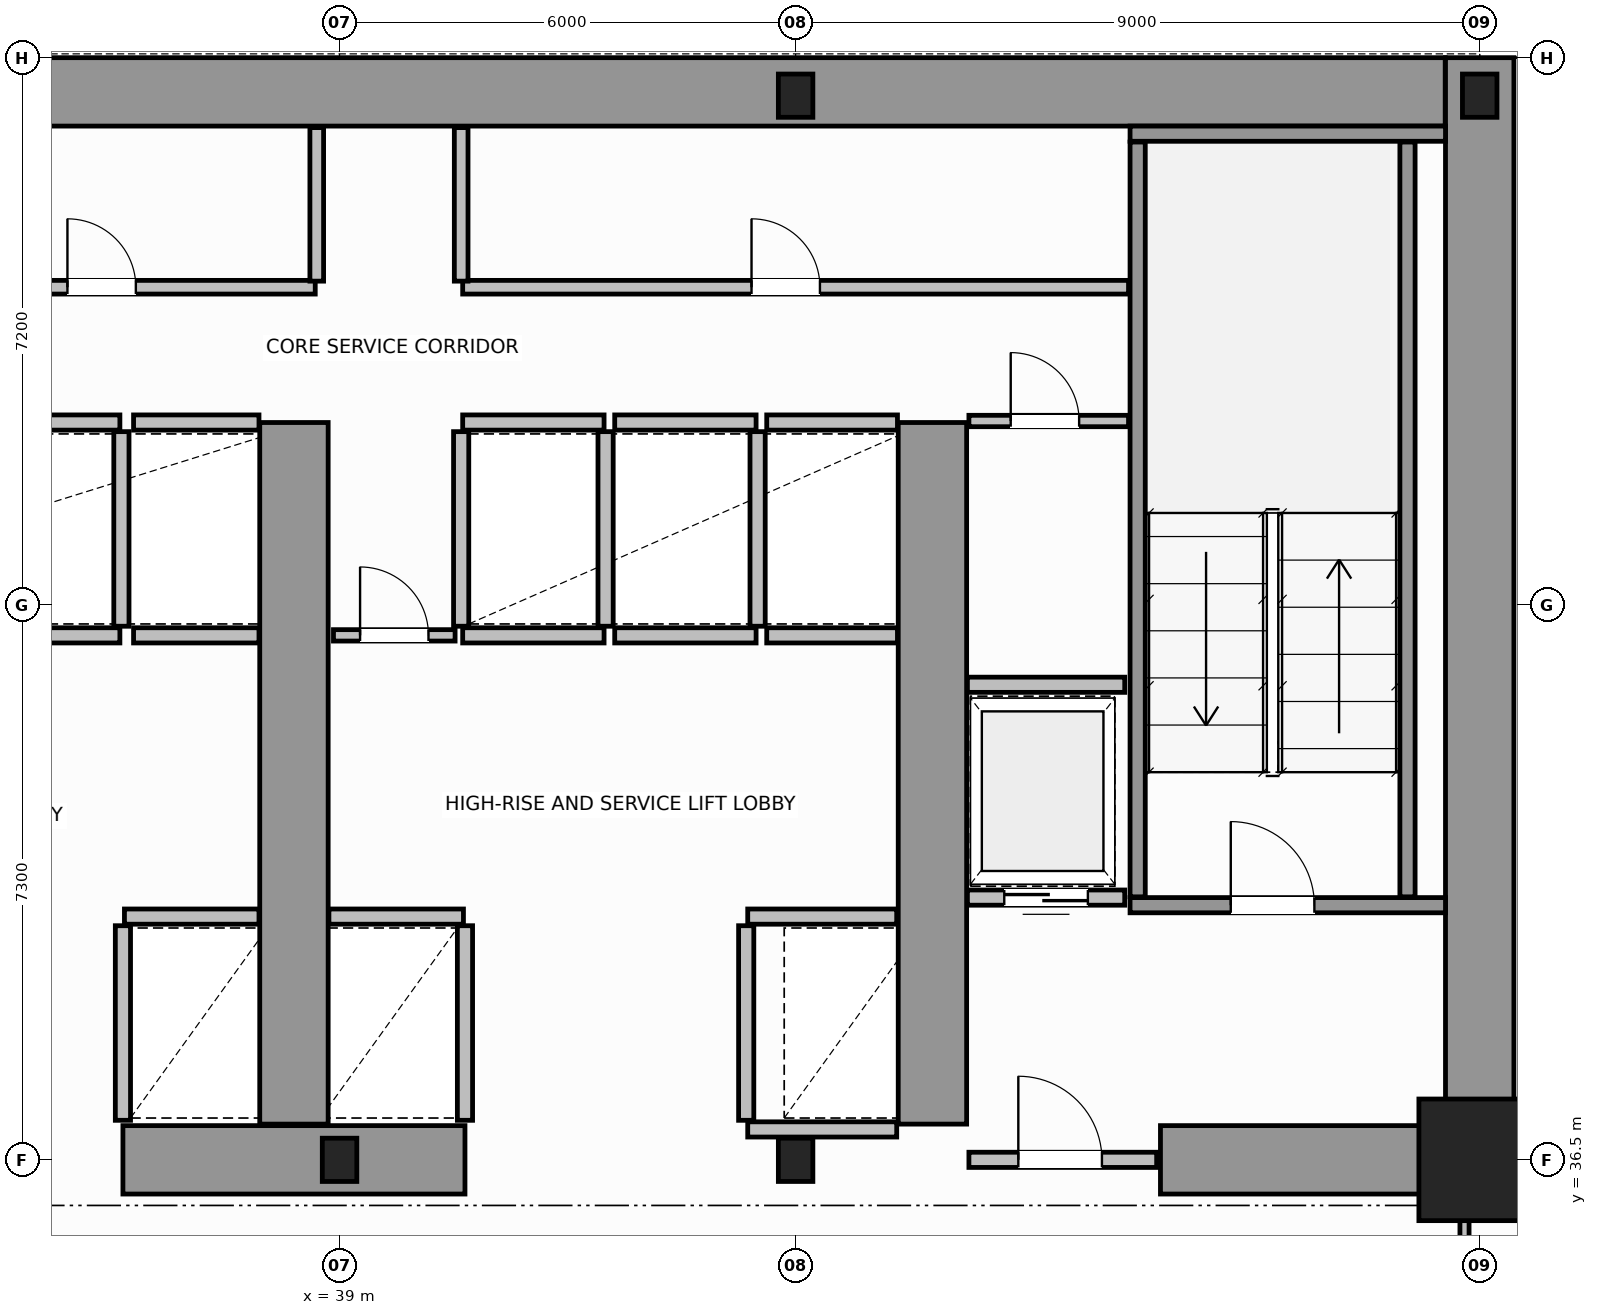
"""IFC4 building model, lengths in metres.
Left out: names, types, materials, properties, quantities, classifications, styles, units other than length and angle.
Written with IfcOpenShell. Run it as: python <this file> out.ifc"""

import sys

from ifc_helpers import new_model, si_unit, direction, frame, frame_2d, origin, origin_2d, place, context, subcontext, project, spatial, rectangle, i_section, extrude, source, transform, mapped, element, fill, save


model = new_model("IFC4")
c1 = context("Model", 3, precision=1e-05, world=origin(), true_north=direction((0.0, 1.0)))
c2 = subcontext(c1, "Body", "Model", "MODEL_VIEW")
j1 = project(units=[si_unit("LENGTHUNIT", "METRE"), si_unit("PLANEANGLEUNIT", "RADIAN")], contexts=[c1])
p1 = place(None, origin())
s1 = spatial("IfcSite", under=j1, at=p1, CompositionType="ELEMENT")
p2 = place(p1, origin())
s2 = spatial("IfcBuilding", under=s1, at=p2, CompositionType="ELEMENT")
p3 = place(p2, frame((0.0, 0.0, 26.4)))
s3 = spatial("IfcBuildingStorey", under=s2, at=p3, CompositionType="ELEMENT", Elevation=26.4)
m1 = source(origin(), c2, "Body", "SweptSolid", [
    extrude(i_section(OverallWidth=0.454, OverallDepth=0.569, WebThickness=0.078, FlangeThickness=0.08, FilletRadius=0.015, at=origin_2d()), origin(), (0.0, 0.0, 1.0), 3.8),
])
for number, where, z_axis, x_axis in (
    (1, (39.0, 36.5, 0.0), (0.0, 0.0, 1.0), (1.0, 0.0, 0.0)),
    (2, (45.0, 36.5, 0.0), (0.0, 0.0, 1.0), (1.0, 0.0, 0.0)),
):
    element("IfcColumn", number, at=place(p3, frame(where, z_axis=z_axis, x_axis=x_axis)), inside=s3, PredefinedType="COLUMN", context=c2, shape_type="MappedRepresentation", body=[
        mapped(m1, transform((0.0, 0.0, 0.0), scale=1.0)),
    ])
m2 = source(origin(), c2, "Body", "SweptSolid", [
    extrude(rectangle(XDim=1.6, YDim=1.6, at=origin_2d()), origin(), (0.0, 0.0, 1.0), 3.8),
])
p4 = place(p3, frame((54.0, 36.5, 0.0), z_axis=(0.0, 0.0, 1.0), x_axis=(1.0, 0.0, 0.0)))
e3 = element("IfcColumn", 3, at=p4, inside=s3, PredefinedType="COLUMN", context=c2, shape_type="MappedRepresentation", body=[
    mapped(m2, transform((0.0, 0.0, 0.0), scale=1.0)),
])
for number, where, z_axis, x_axis in (
    (4, (45.0, 50.5, 0.0), (0.0, 0.0, 1.0), (1.0, 0.0, 0.0)),
    (5, (54.0, 50.5, 0.0), (0.0, 0.0, 1.0), (1.0, 0.0, 0.0)),
):
    element("IfcColumn", number, at=place(p3, frame(where, z_axis=z_axis, x_axis=x_axis)), inside=s3, PredefinedType="COLUMN", context=c2, shape_type="MappedRepresentation", body=[
        mapped(m1, transform((0.0, 0.0, 0.0), scale=1.0)),
    ])
p5 = place(p3, frame((34.002, 50.55, 0.0), z_axis=(0.0, 0.0, 1.0), x_axis=(1.0, 0.0, 0.0)))
e6 = element("IfcWall", 6, at=p5, inside=s3, PredefinedType="SHEAR", context=c2, shape_type="SweptSolid", body=[
    extrude(rectangle(XDim=19.544, YDim=0.9, at=frame_2d((9.772, 0.0))), origin(), (0.0, 0.0, 1.0), 3.8),
])
p6 = place(p3, frame((54.0, 36.5, 0.0), z_axis=(0.0, 0.0, 1.0), x_axis=(0.0, 1.0, 0.0)))
e7 = element("IfcWall", 7, at=p6, inside=s3, PredefinedType="SHEAR", context=c2, shape_type="SweptSolid", body=[
    extrude(rectangle(XDim=14.5, YDim=0.9, at=frame_2d((7.25, 0.0))), origin(), (0.0, 0.0, 1.0), 3.8),
])
p7 = place(p3, frame((36.15, 36.5, 0.0), z_axis=(0.0, 0.0, 1.0), x_axis=(1.0, 0.0, 0.0)))
e8 = element("IfcWall", 8, at=p7, inside=s3, PredefinedType="SHEAR", context=c2, shape_type="SweptSolid", body=[
    extrude(rectangle(XDim=4.5, YDim=0.9, at=frame_2d((2.25, 0.0))), origin(), (0.0, 0.0, 1.0), 3.8),
])
p8 = place(p3, frame((49.8, 36.5, 0.0), z_axis=(0.0, 0.0, 1.0), x_axis=(1.0, 0.0, 0.0)))
e9 = element("IfcWall", 9, at=p8, inside=s3, PredefinedType="SHEAR", context=c2, shape_type="SweptSolid", body=[
    extrude(rectangle(XDim=3.73, YDim=0.9, at=frame_2d((1.865, 0.0))), origin(), (0.0, 0.0, 1.0), 2.38),
])
for number, where, z_axis, x_axis in (
    (10, (38.4, 36.97, 0.0), (0.0, 0.0, 1.0), (0.0, 1.0, 0.0)),
    (11, (46.8, 36.97, 0.0), (0.0, 0.0, 1.0), (0.0, 1.0, 0.0)),
):
    element("IfcWall", number, at=place(p3, frame(where, z_axis=z_axis, x_axis=x_axis)), inside=s3, PredefinedType="SHEAR", context=c2, shape_type="SweptSolid", body=[
        extrude(rectangle(XDim=9.23, YDim=0.9, at=frame_2d((4.615, 0.0))), origin(), (0.0, 0.0, 1.0), 3.8),
    ])
p9 = place(p3, frame((49.4, 39.85, 0.0), z_axis=(0.0, 0.0, 1.0), x_axis=(1.0, 0.0, 0.0)))
e12 = element("IfcWall", 12, at=p9, inside=s3, PredefinedType="SOLIDWALL", context=c2, shape_type="SweptSolid", body=[
    extrude(rectangle(XDim=4.15, YDim=0.2, at=frame_2d((2.075, 0.0))), origin(), (0.0, 0.0, 1.0), 3.8),
])
p10 = place(p9, frame((1.325, 0.0, 0.0)))
e13 = element("IfcOpeningElement", 13, at=p10, cuts=e12, PredefinedType="OPENING", context=c2, shape_type="SweptSolid", body=[
    extrude(rectangle(XDim=1.1, YDim=2.15, at=frame_2d((0.55, 1.075))), frame((0.0, 0.11, 0.0), z_axis=(0.0, -1.0, 0.0), x_axis=(1.0, 0.0, 0.0)), (0.0, 0.0, 1.0), 0.22),
])
p11 = place(p3, frame((49.4, 50.0, 0.0), z_axis=(0.0, 0.0, 1.0), x_axis=(1.0, 0.0, 0.0)))
e14 = element("IfcWall", 14, at=p11, inside=s3, PredefinedType="SOLIDWALL", context=c2, shape_type="SweptSolid", body=[
    extrude(rectangle(XDim=4.15, YDim=0.2, at=frame_2d((2.075, 0.0))), origin(), (0.0, 0.0, 1.0), 3.8),
])
for number, where, z_axis, x_axis in (
    (15, (49.5, 39.96, 0.0), (0.0, 0.0, 1.0), (0.0, 1.0, 0.0)),
    (16, (53.05, 39.96, 0.0), (0.0, 0.0, 1.0), (0.0, 1.0, 0.0)),
):
    element("IfcWall", number, at=place(p3, frame(where, z_axis=z_axis, x_axis=x_axis)), inside=s3, PredefinedType="SOLIDWALL", context=c2, shape_type="SweptSolid", body=[
        extrude(rectangle(XDim=9.93, YDim=0.2, at=frame_2d((4.965, 0.0))), origin(), (0.0, 0.0, 1.0), 3.8),
    ])
p12 = place(p3, frame((47.28, 36.5, 0.0), z_axis=(0.0, 0.0, 1.0), x_axis=(1.0, 0.0, 0.0)))
e17 = element("IfcWall", 17, at=p12, inside=s3, PredefinedType="SOLIDWALL", context=c2, shape_type="SweptSolid", body=[
    extrude(rectangle(XDim=2.47, YDim=0.2, at=frame_2d((1.235, 0.0))), origin(), (0.0, 0.0, 1.0), 2.37),
])
p13 = place(p12, frame((0.65, 0.0, 0.0)))
e18 = element("IfcOpeningElement", 18, at=p13, cuts=e17, PredefinedType="OPENING", context=c2, shape_type="SweptSolid", body=[
    extrude(rectangle(XDim=1.1, YDim=2.15, at=frame_2d((0.55, 1.075))), frame((0.0, 0.11, 0.0), z_axis=(0.0, -1.0, 0.0), x_axis=(1.0, 0.0, 0.0)), (0.0, 0.0, 1.0), 0.22),
])
p14 = place(p3, frame((36.17, 39.7, 0.0), z_axis=(0.0, 0.0, 1.0), x_axis=(1.0, 0.0, 0.0)))
e19 = element("IfcWall", 19, at=p14, inside=s3, PredefinedType="SOLIDWALL", context=c2, shape_type="SweptSolid", body=[
    extrude(rectangle(XDim=1.77, YDim=0.2, at=frame_2d((0.885, 0.0))), origin(), (0.0, 0.0, 1.0), 3.58),
])
p15 = place(p3, frame((36.15, 37.02, 0.0), z_axis=(0.0, 0.0, 1.0), x_axis=(0.0, 1.0, 0.0)))
e20 = element("IfcWall", 20, at=p15, inside=s3, PredefinedType="SOLIDWALL", context=c2, shape_type="SweptSolid", body=[
    extrude(rectangle(XDim=2.56, YDim=0.2, at=frame_2d((1.28, 0.0))), origin(), (0.0, 0.0, 1.0), 3.58),
])
for number, where, z_axis, x_axis in (
    (21, (34.19, 43.4, 0.0), (0.0, 0.0, 1.0), (1.0, 0.0, 0.0)),
    (22, (34.19, 46.2, 0.0), (0.0, 0.0, 1.0), (1.0, 0.0, 0.0)),
):
    element("IfcWall", number, at=place(p3, frame(where, z_axis=z_axis, x_axis=x_axis)), inside=s3, PredefinedType="SOLIDWALL", context=c2, shape_type="SweptSolid", body=[
        extrude(rectangle(XDim=1.92, YDim=0.2, at=frame_2d((0.96, 0.0))), origin(), (0.0, 0.0, 1.0), 3.58),
    ])
p16 = place(p3, frame((36.13, 43.52, 0.0), z_axis=(0.0, 0.0, 1.0), x_axis=(0.0, 1.0, 0.0)))
e23 = element("IfcWall", 23, at=p16, inside=s3, PredefinedType="SOLIDWALL", context=c2, shape_type="SweptSolid", body=[
    extrude(rectangle(XDim=2.56, YDim=0.2, at=frame_2d((1.28, 0.0))), origin(), (0.0, 0.0, 1.0), 3.58),
])
for number, where, z_axis, x_axis in (
    (24, (36.29, 43.4, 0.0), (0.0, 0.0, 1.0), (1.0, 0.0, 0.0)),
    (25, (36.29, 46.2, 0.0), (0.0, 0.0, 1.0), (1.0, 0.0, 0.0)),
):
    element("IfcWall", number, at=place(p3, frame(where, z_axis=z_axis, x_axis=x_axis)), inside=s3, PredefinedType="SOLIDWALL", context=c2, shape_type="SweptSolid", body=[
        extrude(rectangle(XDim=1.65, YDim=0.2, at=frame_2d((0.825, 0.0))), origin(), (0.0, 0.0, 1.0), 3.58),
    ])
p17 = place(p3, frame((38.86, 39.7, 0.0), z_axis=(0.0, 0.0, 1.0), x_axis=(1.0, 0.0, 0.0)))
e26 = element("IfcWall", 26, at=p17, inside=s3, PredefinedType="SOLIDWALL", context=c2, shape_type="SweptSolid", body=[
    extrude(rectangle(XDim=1.77, YDim=0.2, at=frame_2d((0.885, 0.0))), origin(), (0.0, 0.0, 1.0), 3.58),
])
p18 = place(p3, frame((40.65, 37.02, 0.0), z_axis=(0.0, 0.0, 1.0), x_axis=(0.0, 1.0, 0.0)))
e27 = element("IfcWall", 27, at=p18, inside=s3, PredefinedType="SOLIDWALL", context=c2, shape_type="SweptSolid", body=[
    extrude(rectangle(XDim=2.56, YDim=0.2, at=frame_2d((1.28, 0.0))), origin(), (0.0, 0.0, 1.0), 3.58),
])
p19 = place(p3, frame((44.37, 39.7, 0.0), z_axis=(0.0, 0.0, 1.0), x_axis=(1.0, 0.0, 0.0)))
e28 = element("IfcWall", 28, at=p19, inside=s3, PredefinedType="SOLIDWALL", context=c2, shape_type="SweptSolid", body=[
    extrude(rectangle(XDim=1.96, YDim=0.2, at=frame_2d((0.98, 0.0))), origin(), (0.0, 0.0, 1.0), 3.58),
])
p20 = place(p3, frame((44.37, 36.9, 0.0), z_axis=(0.0, 0.0, 1.0), x_axis=(1.0, 0.0, 0.0)))
e29 = element("IfcWall", 29, at=p20, inside=s3, PredefinedType="SOLIDWALL", context=c2, shape_type="SweptSolid", body=[
    extrude(rectangle(XDim=1.96, YDim=0.2, at=frame_2d((0.98, 0.0))), origin(), (0.0, 0.0, 1.0), 2.37),
])
p21 = place(p3, frame((44.35, 37.02, 0.0), z_axis=(0.0, 0.0, 1.0), x_axis=(0.0, 1.0, 0.0)))
e30 = element("IfcWall", 30, at=p21, inside=s3, PredefinedType="SOLIDWALL", context=c2, shape_type="SweptSolid", body=[
    extrude(rectangle(XDim=2.56, YDim=0.2, at=frame_2d((1.28, 0.0))), origin(), (0.0, 0.0, 1.0), 3.58),
])
for number, where, z_axis, x_axis in (
    (31, (40.62, 43.4, 0.0), (0.0, 0.0, 1.0), (1.0, 0.0, 0.0)),
    (32, (40.62, 46.2, 0.0), (0.0, 0.0, 1.0), (1.0, 0.0, 0.0)),
):
    element("IfcWall", number, at=place(p3, frame(where, z_axis=z_axis, x_axis=x_axis)), inside=s3, PredefinedType="SOLIDWALL", context=c2, shape_type="SweptSolid", body=[
        extrude(rectangle(XDim=1.86, YDim=0.2, at=frame_2d((0.93, 0.0))), origin(), (0.0, 0.0, 1.0), 3.58),
    ])
for number, where, z_axis, x_axis in (
    (33, (40.6, 43.52, 0.0), (0.0, 0.0, 1.0), (0.0, 1.0, 0.0)),
    (34, (42.5, 43.52, 0.0), (0.0, 0.0, 1.0), (0.0, 1.0, 0.0)),
):
    element("IfcWall", number, at=place(p3, frame(where, z_axis=z_axis, x_axis=x_axis)), inside=s3, PredefinedType="SOLIDWALL", context=c2, shape_type="SweptSolid", body=[
        extrude(rectangle(XDim=2.56, YDim=0.2, at=frame_2d((1.28, 0.0))), origin(), (0.0, 0.0, 1.0), 3.58),
    ])
for number, where, z_axis, x_axis in (
    (35, (42.62, 43.4, 0.0), (0.0, 0.0, 1.0), (1.0, 0.0, 0.0)),
    (36, (42.62, 46.2, 0.0), (0.0, 0.0, 1.0), (1.0, 0.0, 0.0)),
):
    element("IfcWall", number, at=place(p3, frame(where, z_axis=z_axis, x_axis=x_axis)), inside=s3, PredefinedType="SOLIDWALL", context=c2, shape_type="SweptSolid", body=[
        extrude(rectangle(XDim=1.86, YDim=0.2, at=frame_2d((0.93, 0.0))), origin(), (0.0, 0.0, 1.0), 3.58),
    ])
p22 = place(p3, frame((44.5, 43.52, 0.0), z_axis=(0.0, 0.0, 1.0), x_axis=(0.0, 1.0, 0.0)))
e37 = element("IfcWall", 37, at=p22, inside=s3, PredefinedType="SOLIDWALL", context=c2, shape_type="SweptSolid", body=[
    extrude(rectangle(XDim=2.56, YDim=0.2, at=frame_2d((1.28, 0.0))), origin(), (0.0, 0.0, 1.0), 3.58),
])
for number, where, z_axis, x_axis in (
    (38, (44.62, 43.4, 0.0), (0.0, 0.0, 1.0), (1.0, 0.0, 0.0)),
    (39, (44.62, 46.2, 0.0), (0.0, 0.0, 1.0), (1.0, 0.0, 0.0)),
):
    element("IfcWall", number, at=place(p3, frame(where, z_axis=z_axis, x_axis=x_axis)), inside=s3, PredefinedType="SOLIDWALL", context=c2, shape_type="SweptSolid", body=[
        extrude(rectangle(XDim=1.72, YDim=0.2, at=frame_2d((0.86, 0.0))), origin(), (0.0, 0.0, 1.0), 3.58),
    ])
p23 = place(p3, frame((47.26, 39.95, 0.0), z_axis=(0.0, 0.0, 1.0), x_axis=(1.0, 0.0, 0.0)))
e40 = element("IfcWall", 40, at=p23, inside=s3, PredefinedType="SOLIDWALL", context=c2, shape_type="SweptSolid", body=[
    extrude(rectangle(XDim=2.07, YDim=0.2, at=frame_2d((1.035, 0.0))), origin(), (0.0, 0.0, 1.0), 3.58),
])
p24 = place(p23, frame((0.485, 0.0, 0.0)))
e41 = element("IfcOpeningElement", 41, at=p24, cuts=e40, PredefinedType="OPENING", context=c2, shape_type="SweptSolid", body=[
    extrude(rectangle(XDim=1.1, YDim=2.15, at=frame_2d((0.55, 1.075))), frame((0.0, 0.11, 0.0), z_axis=(0.0, -1.0, 0.0), x_axis=(1.0, 0.0, 0.0)), (0.0, 0.0, 1.0), 0.22),
])
p25 = place(p3, frame((47.26, 42.75, 0.0), z_axis=(0.0, 0.0, 1.0), x_axis=(1.0, 0.0, 0.0)))
e42 = element("IfcWall", 42, at=p25, inside=s3, PredefinedType="SOLIDWALL", context=c2, shape_type="SweptSolid", body=[
    extrude(rectangle(XDim=2.07, YDim=0.2, at=frame_2d((1.035, 0.0))), origin(), (0.0, 0.0, 1.0), 3.58),
])
p26 = place(p3, frame((47.28, 46.22, 0.0), z_axis=(0.0, 0.0, 1.0), x_axis=(1.0, 0.0, 0.0)))
e43 = element("IfcWall", 43, at=p26, inside=s3, PredefinedType="PARTITIONING", context=c2, shape_type="SweptSolid", body=[
    extrude(rectangle(XDim=2.1, YDim=0.15, at=frame_2d((1.05, 0.0))), origin(), (0.0, 0.0, 1.0), 3.58),
])
p27 = place(p26, frame((0.55, 0.0, 0.0)))
e44 = element("IfcOpeningElement", 44, at=p27, cuts=e43, PredefinedType="OPENING", context=c2, shape_type="SweptSolid", body=[
    extrude(rectangle(XDim=0.9, YDim=2.1, at=frame_2d((0.45, 1.05))), frame((0.0, 0.085, 0.0), z_axis=(0.0, -1.0, 0.0), x_axis=(1.0, 0.0, 0.0)), (0.0, 0.0, 1.0), 0.17),
])
p28 = place(p3, frame((38.92, 43.4, 0.0), z_axis=(0.0, 0.0, 1.0), x_axis=(1.0, 0.0, 0.0)))
e45 = element("IfcWall", 45, at=p28, inside=s3, PredefinedType="PARTITIONING", context=c2, shape_type="SweptSolid", body=[
    extrude(rectangle(XDim=1.6, YDim=0.15, at=frame_2d((0.8, 0.0))), origin(), (0.0, 0.0, 1.0), 3.58),
])
p29 = place(p28, frame((0.35, 0.0, 0.0)))
e46 = element("IfcOpeningElement", 46, at=p29, cuts=e45, PredefinedType="OPENING", context=c2, shape_type="SweptSolid", body=[
    extrude(rectangle(XDim=0.9, YDim=2.1, at=frame_2d((0.45, 1.05))), frame((0.0, 0.085, 0.0), z_axis=(0.0, -1.0, 0.0), x_axis=(1.0, 0.0, 0.0)), (0.0, 0.0, 1.0), 0.17),
])
p30 = place(p3, frame((18.62, 47.98, 0.0), z_axis=(0.0, 0.0, 1.0), x_axis=(1.0, 0.0, 0.0)))
e47 = element("IfcWall", 47, at=p30, inside=s3, PredefinedType="PLUMBINGWALL", context=c2, shape_type="SweptSolid", body=[
    extrude(rectangle(XDim=20.06, YDim=0.18, at=frame_2d((10.03, 0.0))), origin(), (0.0, 0.0, 1.0), 3.58),
])
p31 = place(p30, frame((3.5, 0.0, 0.0)))
e48 = element("IfcOpeningElement", 48, at=p31, cuts=e47, PredefinedType="OPENING", context=c2, shape_type="SweptSolid", body=[
    extrude(rectangle(XDim=0.9, YDim=2.15, at=frame_2d((0.45, 1.075))), frame((0.0, 0.1, 0.0), z_axis=(0.0, -1.0, 0.0), x_axis=(1.0, 0.0, 0.0)), (0.0, 0.0, 1.0), 0.2),
])
p32 = place(p30, frame((10.8, 0.0, 0.0)))
e49 = element("IfcOpeningElement", 49, at=p32, cuts=e47, PredefinedType="OPENING", context=c2, shape_type="SweptSolid", body=[
    extrude(rectangle(XDim=0.9, YDim=2.15, at=frame_2d((0.45, 1.075))), frame((0.0, 0.1, 0.0), z_axis=(0.0, -1.0, 0.0), x_axis=(1.0, 0.0, 0.0)), (0.0, 0.0, 1.0), 0.2),
])
p33 = place(p30, frame((16.8, 0.0, 0.0)))
e50 = element("IfcOpeningElement", 50, at=p33, cuts=e47, PredefinedType="OPENING", context=c2, shape_type="SweptSolid", body=[
    extrude(rectangle(XDim=0.9, YDim=2.15, at=frame_2d((0.45, 1.075))), frame((0.0, 0.1, 0.0), z_axis=(0.0, -1.0, 0.0), x_axis=(1.0, 0.0, 0.0)), (0.0, 0.0, 1.0), 0.2),
])
p34 = place(p3, frame((40.62, 47.98, 0.0), z_axis=(0.0, 0.0, 1.0), x_axis=(1.0, 0.0, 0.0)))
e51 = element("IfcWall", 51, at=p34, inside=s3, PredefinedType="PLUMBINGWALL", context=c2, shape_type="SweptSolid", body=[
    extrude(rectangle(XDim=8.76, YDim=0.18, at=frame_2d((4.38, 0.0))), origin(), (0.0, 0.0, 1.0), 3.58),
])
p35 = place(p34, frame((3.8, 0.0, 0.0)))
e52 = element("IfcOpeningElement", 52, at=p35, cuts=e51, PredefinedType="OPENING", context=c2, shape_type="SweptSolid", body=[
    extrude(rectangle(XDim=0.9, YDim=2.15, at=frame_2d((0.45, 1.075))), frame((0.0, 0.1, 0.0), z_axis=(0.0, -1.0, 0.0), x_axis=(1.0, 0.0, 0.0)), (0.0, 0.0, 1.0), 0.2),
])
for number, where, z_axis, x_axis in (
    (53, (38.7, 48.06, 0.0), (0.0, 0.0, 1.0), (0.0, 1.0, 0.0)),
    (54, (40.6, 48.06, 0.0), (0.0, 0.0, 1.0), (0.0, 1.0, 0.0)),
):
    element("IfcWall", number, at=place(p3, frame(where, z_axis=z_axis, x_axis=x_axis)), inside=s3, PredefinedType="PLUMBINGWALL", context=c2, shape_type="SweptSolid", body=[
        extrude(rectangle(XDim=2.02, YDim=0.18, at=frame_2d((1.01, 0.0))), origin(), (0.0, 0.0, 1.0), 3.58),
    ])
p36 = place(p3, frame((53.8, 34.16, 0.0), z_axis=(0.0, 0.0, 1.0), x_axis=(0.0, 1.0, 0.0)))
e55 = element("IfcWall", 55, at=p36, inside=s3, PredefinedType="PARTITIONING", context=c2, shape_type="SweptSolid", body=[
    extrude(rectangle(XDim=2.28, YDim=0.12, at=frame_2d((1.14, 0.0))), origin(), (0.0, 0.0, 1.0), 3.58),
])
p37 = place(p36, frame((0.3, 0.0, 0.0)))
e56 = element("IfcOpeningElement", 56, at=p37, cuts=e55, PredefinedType="OPENING", context=c2, shape_type="SweptSolid", body=[
    extrude(rectangle(XDim=0.9, YDim=2.15, at=frame_2d((0.45, 1.075))), frame((0.0, 0.07, 0.0), z_axis=(0.0, -1.0, 0.0), x_axis=(1.0, 0.0, 0.0)), (0.0, 0.0, 1.0), 0.14),
])
m3 = source(origin(), c2, "Body", "SweptSolid", [
    extrude(rectangle(XDim=1.1, YDim=2.15, at=frame_2d((0.55, 1.075))), frame((0.0, 0.025, 0.0), z_axis=(0.0, -1.0, 0.0), x_axis=(1.0, 0.0, 0.0)), (0.0, 0.0, 1.0), 0.05),
])
p38 = place(p10, origin())
e57 = element("IfcDoor", 57, at=p38, inside=s3, OperationType="SINGLE_SWING_RIGHT", PredefinedType="DOOR", context=c2, shape_type="MappedRepresentation", body=[
    mapped(m3, transform((0.0, 0.0, 0.0), scale=1.0)),
])
fill(e13, e57)
p39 = place(p13, origin())
e58 = element("IfcDoor", 58, at=p39, inside=s3, OperationType="SINGLE_SWING_LEFT", PredefinedType="DOOR", context=c2, shape_type="MappedRepresentation", body=[
    mapped(m3, transform((0.0, 0.0, 0.0), scale=1.0)),
])
fill(e18, e58)
p40 = place(p24, origin())
e59 = element("IfcDoor", 59, at=p40, inside=s3, OperationType="DOUBLE_DOOR_SLIDING", PredefinedType="DOOR", context=c2, shape_type="MappedRepresentation", body=[
    mapped(m3, transform((0.0, 0.0, 0.0), scale=1.0)),
])
fill(e41, e59)
m4 = source(origin(), c2, "Body", "SweptSolid", [
    extrude(rectangle(XDim=0.9, YDim=2.1, at=frame_2d((0.45, 1.05))), frame((0.0, 0.025, 0.0), z_axis=(0.0, -1.0, 0.0), x_axis=(1.0, 0.0, 0.0)), (0.0, 0.0, 1.0), 0.05),
])
p41 = place(p27, origin())
e60 = element("IfcDoor", 60, at=p41, inside=s3, OperationType="SINGLE_SWING_RIGHT", PredefinedType="DOOR", context=c2, shape_type="MappedRepresentation", body=[
    mapped(m4, transform((0.0, 0.0, 0.0), scale=1.0)),
])
fill(e44, e60)
p42 = place(p29, origin())
e61 = element("IfcDoor", 61, at=p42, inside=s3, OperationType="SINGLE_SWING_LEFT", PredefinedType="DOOR", context=c2, shape_type="MappedRepresentation", body=[
    mapped(m4, transform((0.0, 0.0, 0.0), scale=1.0)),
])
fill(e46, e61)
m5 = source(origin(), c2, "Body", "SweptSolid", [
    extrude(rectangle(XDim=0.9, YDim=2.15, at=frame_2d((0.45, 1.075))), frame((0.0, 0.025, 0.0), z_axis=(0.0, -1.0, 0.0), x_axis=(1.0, 0.0, 0.0)), (0.0, 0.0, 1.0), 0.05),
])
p43 = place(p33, origin())
e62 = element("IfcDoor", 62, at=p43, inside=s3, OperationType="SINGLE_SWING_LEFT", PredefinedType="DOOR", context=c2, shape_type="MappedRepresentation", body=[
    mapped(m5, transform((0.0, 0.0, 0.0), scale=1.0)),
])
fill(e50, e62)
p44 = place(p35, origin())
e63 = element("IfcDoor", 63, at=p44, inside=s3, OperationType="SINGLE_SWING_RIGHT", PredefinedType="DOOR", context=c2, shape_type="MappedRepresentation", body=[
    mapped(m5, transform((0.0, 0.0, 0.0), scale=1.0)),
])
fill(e52, e63)
save(model, sys.argv[1])
